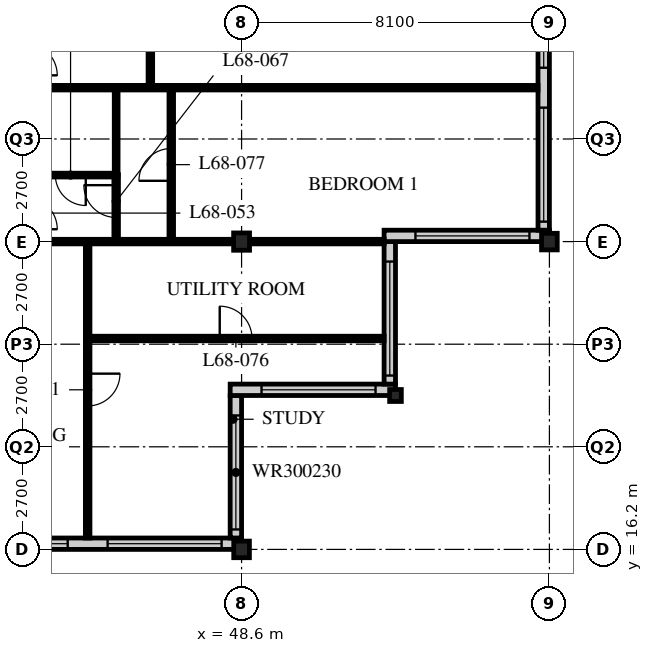
"""IFC4 building model, lengths in metres.
Left out: names, types, materials, properties, quantities, classifications, styles, units other than length and angle.
Written with IfcOpenShell. Run it as: python <this file> out.ifc"""

import sys

from ifc_helpers import new_model, si_unit, direction, frame, frame_2d, origin, origin_2d, place, context, subcontext, project, spatial, rectangle, i_section, extrude, element, fill, save


model = new_model("IFC4")
c1 = context("Model", 3, precision=1e-05, world=origin(), true_north=direction((0.0, 1.0)))
c2 = subcontext(c1, "Body", "Model", "MODEL_VIEW")
j1 = project(units=[si_unit("LENGTHUNIT", "METRE"), si_unit("PLANEANGLEUNIT", "RADIAN")], contexts=[c1])
p1 = place(None, origin())
s1 = spatial("IfcSite", under=j1, at=p1, CompositionType="ELEMENT")
p2 = place(p1, origin())
s2 = spatial("IfcBuilding", under=s1, at=p2, CompositionType="ELEMENT")
p3 = place(p2, frame((0.0, 0.0, 265.8)))
s3 = spatial("IfcBuildingStorey", under=s2, at=p3, CompositionType="ELEMENT", Elevation=265.8)
p4 = place(p3, frame((48.6, 16.2, 0.0), z_axis=(0.0, 0.0, 1.0), x_axis=(1.0, 0.0, 0.0)))
e1 = element("IfcColumn", 1, at=p4, inside=s3, PredefinedType="COLUMN", context=c2, shape_type="SweptSolid", body=[
    extrude(i_section(OverallWidth=0.412, OverallDepth=0.437, WebThickness=0.036, FlangeThickness=0.058, FilletRadius=0.015, at=origin_2d()), origin(), (0.0, 0.0, 1.0), 3.9),
])
p5 = place(p3, frame((48.6, 24.3, 0.0), z_axis=(0.0, 0.0, 1.0), x_axis=(1.0, 0.0, 0.0)))
e2 = element("IfcColumn", 2, at=p5, inside=s3, PredefinedType="COLUMN", context=c2, shape_type="SweptSolid", body=[
    extrude(i_section(OverallWidth=0.418, OverallDepth=0.456, WebThickness=0.042, FlangeThickness=0.067, FilletRadius=0.015, at=origin_2d()), origin(), (0.0, 0.0, 1.0), 3.9),
])
p6 = place(p3, frame((52.65, 20.25, 0.0), z_axis=(0.0, 0.0, 1.0), x_axis=(1.0, 0.0, 0.0)))
e3 = element("IfcColumn", 3, at=p6, inside=s3, PredefinedType="COLUMN", context=c2, shape_type="SweptSolid", body=[
    extrude(i_section(OverallWidth=0.307, OverallDepth=0.314, WebThickness=0.012, FlangeThickness=0.019, FilletRadius=0.015, at=origin_2d()), origin(), (0.0, 0.0, 1.0), 3.9),
])
p7 = place(p3, frame((56.7, 24.3, 0.0), z_axis=(0.0, 0.0, 1.0), x_axis=(1.0, 0.0, 0.0)))
e4 = element("IfcColumn", 4, at=p7, inside=s3, PredefinedType="COLUMN", context=c2, shape_type="SweptSolid", body=[
    extrude(i_section(OverallWidth=0.412, OverallDepth=0.437, WebThickness=0.036, FlangeThickness=0.058, FilletRadius=0.015, at=origin_2d()), origin(), (0.0, 0.0, 1.0), 3.9),
])
p8 = place(p3, frame((8.4, 16.35, 0.0), z_axis=(0.0, 0.0, 1.0), x_axis=(1.0, 0.0, 0.0)))
e5 = element("IfcWall", 5, at=p8, inside=s3, PredefinedType="SOLIDWALL", context=c2, shape_type="SweptSolid", body=[
    extrude(rectangle(XDim=40.2, YDim=0.3, at=frame_2d((20.1, 0.0))), origin(), (0.0, 0.0, 1.0), 3.69),
])
p9 = place(p8, frame((0.225, 0.0, 0.6)))
e6 = element("IfcOpeningElement", 6, at=p9, cuts=e5, PredefinedType="OPENING", context=c2, shape_type="SweptSolid", body=[
    extrude(rectangle(XDim=3.0, YDim=2.4, at=frame_2d((1.5, 1.2))), frame((0.0, 0.16, 0.0), z_axis=(0.0, -1.0, 0.0), x_axis=(1.0, 0.0, 0.0)), (0.0, 0.0, 1.0), 0.32),
])
p10 = place(p8, frame((4.275, 0.0, 0.6)))
e7 = element("IfcOpeningElement", 7, at=p10, cuts=e5, PredefinedType="OPENING", context=c2, shape_type="SweptSolid", body=[
    extrude(rectangle(XDim=3.0, YDim=2.4, at=frame_2d((1.5, 1.2))), frame((0.0, 0.16, 0.0), z_axis=(0.0, -1.0, 0.0), x_axis=(1.0, 0.0, 0.0)), (0.0, 0.0, 1.0), 0.32),
])
p11 = place(p8, frame((8.325, 0.0, 0.6)))
e8 = element("IfcOpeningElement", 8, at=p11, cuts=e5, PredefinedType="OPENING", context=c2, shape_type="SweptSolid", body=[
    extrude(rectangle(XDim=3.0, YDim=2.4, at=frame_2d((1.5, 1.2))), frame((0.0, 0.16, 0.0), z_axis=(0.0, -1.0, 0.0), x_axis=(1.0, 0.0, 0.0)), (0.0, 0.0, 1.0), 0.32),
])
p12 = place(p8, frame((12.375, 0.0, 0.6)))
e9 = element("IfcOpeningElement", 9, at=p12, cuts=e5, PredefinedType="OPENING", context=c2, shape_type="SweptSolid", body=[
    extrude(rectangle(XDim=3.0, YDim=2.4, at=frame_2d((1.5, 1.2))), frame((0.0, 0.16, 0.0), z_axis=(0.0, -1.0, 0.0), x_axis=(1.0, 0.0, 0.0)), (0.0, 0.0, 1.0), 0.32),
])
p13 = place(p8, frame((16.425, 0.0, 0.6)))
e10 = element("IfcOpeningElement", 10, at=p13, cuts=e5, PredefinedType="OPENING", context=c2, shape_type="SweptSolid", body=[
    extrude(rectangle(XDim=3.0, YDim=2.4, at=frame_2d((1.5, 1.2))), frame((0.0, 0.16, 0.0), z_axis=(0.0, -1.0, 0.0), x_axis=(1.0, 0.0, 0.0)), (0.0, 0.0, 1.0), 0.32),
])
p14 = place(p8, frame((20.475, 0.0, 0.6)))
e11 = element("IfcOpeningElement", 11, at=p14, cuts=e5, PredefinedType="OPENING", context=c2, shape_type="SweptSolid", body=[
    extrude(rectangle(XDim=3.0, YDim=2.4, at=frame_2d((1.5, 1.2))), frame((0.0, 0.16, 0.0), z_axis=(0.0, -1.0, 0.0), x_axis=(1.0, 0.0, 0.0)), (0.0, 0.0, 1.0), 0.32),
])
p15 = place(p8, frame((24.525, 0.0, 0.6)))
e12 = element("IfcOpeningElement", 12, at=p15, cuts=e5, PredefinedType="OPENING", context=c2, shape_type="SweptSolid", body=[
    extrude(rectangle(XDim=3.0, YDim=2.4, at=frame_2d((1.5, 1.2))), frame((0.0, 0.16, 0.0), z_axis=(0.0, -1.0, 0.0), x_axis=(1.0, 0.0, 0.0)), (0.0, 0.0, 1.0), 0.32),
])
p16 = place(p8, frame((28.575, 0.0, 0.6)))
e13 = element("IfcOpeningElement", 13, at=p16, cuts=e5, PredefinedType="OPENING", context=c2, shape_type="SweptSolid", body=[
    extrude(rectangle(XDim=3.0, YDim=2.4, at=frame_2d((1.5, 1.2))), frame((0.0, 0.16, 0.0), z_axis=(0.0, -1.0, 0.0), x_axis=(1.0, 0.0, 0.0)), (0.0, 0.0, 1.0), 0.32),
])
p17 = place(p8, frame((32.625, 0.0, 0.6)))
e14 = element("IfcOpeningElement", 14, at=p17, cuts=e5, PredefinedType="OPENING", context=c2, shape_type="SweptSolid", body=[
    extrude(rectangle(XDim=3.0, YDim=2.4, at=frame_2d((1.5, 1.2))), frame((0.0, 0.16, 0.0), z_axis=(0.0, -1.0, 0.0), x_axis=(1.0, 0.0, 0.0)), (0.0, 0.0, 1.0), 0.32),
])
p18 = place(p8, frame((36.675, 0.0, 0.6)))
e15 = element("IfcOpeningElement", 15, at=p18, cuts=e5, PredefinedType="OPENING", context=c2, shape_type="SweptSolid", body=[
    extrude(rectangle(XDim=3.0, YDim=2.4, at=frame_2d((1.5, 1.2))), frame((0.0, 0.16, 0.0), z_axis=(0.0, -1.0, 0.0), x_axis=(1.0, 0.0, 0.0)), (0.0, 0.0, 1.0), 0.32),
])
p19 = place(p3, frame((48.45, 16.5, 0.0), z_axis=(0.0, 0.0, 1.0), x_axis=(0.0, 1.0, 0.0)))
e16 = element("IfcWall", 16, at=p19, inside=s3, PredefinedType="SOLIDWALL", context=c2, shape_type="SweptSolid", body=[
    extrude(rectangle(XDim=3.75, YDim=0.3, at=frame_2d((1.875, 0.0))), origin(), (0.0, 0.0, 1.0), 3.69),
])
p20 = place(p19, frame((0.225, 0.0, 0.6)))
e17 = element("IfcOpeningElement", 17, at=p20, cuts=e16, PredefinedType="OPENING", context=c2, shape_type="SweptSolid", body=[
    extrude(rectangle(XDim=3.0, YDim=2.3, at=frame_2d((1.5, 1.15))), frame((0.0, 0.16, 0.0), z_axis=(0.0, -1.0, 0.0), x_axis=(1.0, 0.0, 0.0)), (0.0, 0.0, 1.0), 0.32),
])
p21 = place(p3, frame((48.3, 20.4, 0.0), z_axis=(0.0, 0.0, 1.0), x_axis=(1.0, 0.0, 0.0)))
e18 = element("IfcWall", 18, at=p21, inside=s3, PredefinedType="SOLIDWALL", context=c2, shape_type="SweptSolid", body=[
    extrude(rectangle(XDim=4.35, YDim=0.3, at=frame_2d((2.175, 0.0))), origin(), (0.0, 0.0, 1.0), 3.69),
])
p22 = place(p21, frame((0.825, 0.0, 0.6)))
e19 = element("IfcOpeningElement", 19, at=p22, cuts=e18, PredefinedType="OPENING", context=c2, shape_type="SweptSolid", body=[
    extrude(rectangle(XDim=3.0, YDim=2.3, at=frame_2d((1.5, 1.15))), frame((0.0, 0.16, 0.0), z_axis=(0.0, -1.0, 0.0), x_axis=(1.0, 0.0, 0.0)), (0.0, 0.0, 1.0), 0.32),
])
p23 = place(p3, frame((52.5, 20.55, 0.0), z_axis=(0.0, 0.0, 1.0), x_axis=(0.0, 1.0, 0.0)))
e20 = element("IfcWall", 20, at=p23, inside=s3, PredefinedType="SOLIDWALL", context=c2, shape_type="SweptSolid", body=[
    extrude(rectangle(XDim=3.75, YDim=0.3, at=frame_2d((1.875, 0.0))), origin(), (0.0, 0.0, 1.0), 3.69),
])
p24 = place(p23, frame((0.225, 0.0, 0.6)))
e21 = element("IfcOpeningElement", 21, at=p24, cuts=e20, PredefinedType="OPENING", context=c2, shape_type="SweptSolid", body=[
    extrude(rectangle(XDim=3.0, YDim=2.3, at=frame_2d((1.5, 1.15))), frame((0.0, 0.16, 0.0), z_axis=(0.0, -1.0, 0.0), x_axis=(1.0, 0.0, 0.0)), (0.0, 0.0, 1.0), 0.32),
])
p25 = place(p3, frame((52.35, 24.45, 0.0), z_axis=(0.0, 0.0, 1.0), x_axis=(1.0, 0.0, 0.0)))
e22 = element("IfcWall", 22, at=p25, inside=s3, PredefinedType="SOLIDWALL", context=c2, shape_type="SweptSolid", body=[
    extrude(rectangle(XDim=4.35, YDim=0.3, at=frame_2d((2.175, 0.0))), origin(), (0.0, 0.0, 1.0), 3.69),
])
p26 = place(p25, frame((0.825, 0.0, 0.6)))
e23 = element("IfcOpeningElement", 23, at=p26, cuts=e22, PredefinedType="OPENING", context=c2, shape_type="SweptSolid", body=[
    extrude(rectangle(XDim=3.0, YDim=2.3, at=frame_2d((1.5, 1.15))), frame((0.0, 0.16, 0.0), z_axis=(0.0, -1.0, 0.0), x_axis=(1.0, 0.0, 0.0)), (0.0, 0.0, 1.0), 0.32),
])
p27 = place(p3, frame((56.55, 24.6, 0.0), z_axis=(0.0, 0.0, 1.0), x_axis=(0.0, 1.0, 0.0)))
e24 = element("IfcWall", 24, at=p27, inside=s3, PredefinedType="SOLIDWALL", context=c2, shape_type="SweptSolid", body=[
    extrude(rectangle(XDim=32.1, YDim=0.3, at=frame_2d((16.05, 0.0))), origin(), (0.0, 0.0, 1.0), 3.69),
])
p28 = place(p27, frame((0.225, 0.0, 0.6)))
e25 = element("IfcOpeningElement", 25, at=p28, cuts=e24, PredefinedType="OPENING", context=c2, shape_type="SweptSolid", body=[
    extrude(rectangle(XDim=3.0, YDim=2.4, at=frame_2d((1.5, 1.2))), frame((0.0, 0.16, 0.0), z_axis=(0.0, -1.0, 0.0), x_axis=(1.0, 0.0, 0.0)), (0.0, 0.0, 1.0), 0.32),
])
p29 = place(p27, frame((4.275, 0.0, 0.6)))
e26 = element("IfcOpeningElement", 26, at=p29, cuts=e24, PredefinedType="OPENING", context=c2, shape_type="SweptSolid", body=[
    extrude(rectangle(XDim=3.0, YDim=2.4, at=frame_2d((1.5, 1.2))), frame((0.0, 0.16, 0.0), z_axis=(0.0, -1.0, 0.0), x_axis=(1.0, 0.0, 0.0)), (0.0, 0.0, 1.0), 0.32),
])
p30 = place(p27, frame((8.325, 0.0, 0.6)))
e27 = element("IfcOpeningElement", 27, at=p30, cuts=e24, PredefinedType="OPENING", context=c2, shape_type="SweptSolid", body=[
    extrude(rectangle(XDim=3.0, YDim=2.4, at=frame_2d((1.5, 1.2))), frame((0.0, 0.16, 0.0), z_axis=(0.0, -1.0, 0.0), x_axis=(1.0, 0.0, 0.0)), (0.0, 0.0, 1.0), 0.32),
])
p31 = place(p27, frame((12.375, 0.0, 0.6)))
e28 = element("IfcOpeningElement", 28, at=p31, cuts=e24, PredefinedType="OPENING", context=c2, shape_type="SweptSolid", body=[
    extrude(rectangle(XDim=3.0, YDim=2.4, at=frame_2d((1.5, 1.2))), frame((0.0, 0.16, 0.0), z_axis=(0.0, -1.0, 0.0), x_axis=(1.0, 0.0, 0.0)), (0.0, 0.0, 1.0), 0.32),
])
p32 = place(p27, frame((16.425, 0.0, 0.6)))
e29 = element("IfcOpeningElement", 29, at=p32, cuts=e24, PredefinedType="OPENING", context=c2, shape_type="SweptSolid", body=[
    extrude(rectangle(XDim=3.0, YDim=2.4, at=frame_2d((1.5, 1.2))), frame((0.0, 0.16, 0.0), z_axis=(0.0, -1.0, 0.0), x_axis=(1.0, 0.0, 0.0)), (0.0, 0.0, 1.0), 0.32),
])
p33 = place(p27, frame((20.475, 0.0, 0.6)))
e30 = element("IfcOpeningElement", 30, at=p33, cuts=e24, PredefinedType="OPENING", context=c2, shape_type="SweptSolid", body=[
    extrude(rectangle(XDim=3.0, YDim=2.4, at=frame_2d((1.5, 1.2))), frame((0.0, 0.16, 0.0), z_axis=(0.0, -1.0, 0.0), x_axis=(1.0, 0.0, 0.0)), (0.0, 0.0, 1.0), 0.32),
])
p34 = place(p27, frame((24.525, 0.0, 0.6)))
e31 = element("IfcOpeningElement", 31, at=p34, cuts=e24, PredefinedType="OPENING", context=c2, shape_type="SweptSolid", body=[
    extrude(rectangle(XDim=3.0, YDim=2.4, at=frame_2d((1.5, 1.2))), frame((0.0, 0.16, 0.0), z_axis=(0.0, -1.0, 0.0), x_axis=(1.0, 0.0, 0.0)), (0.0, 0.0, 1.0), 0.32),
])
p35 = place(p27, frame((28.575, 0.0, 0.6)))
e32 = element("IfcOpeningElement", 32, at=p35, cuts=e24, PredefinedType="OPENING", context=c2, shape_type="SweptSolid", body=[
    extrude(rectangle(XDim=3.0, YDim=2.4, at=frame_2d((1.5, 1.2))), frame((0.0, 0.16, 0.0), z_axis=(0.0, -1.0, 0.0), x_axis=(1.0, 0.0, 0.0)), (0.0, 0.0, 1.0), 0.32),
])
p36 = place(p3, frame((42.9, 24.3, 0.0), z_axis=(0.0, 0.0, 1.0), x_axis=(1.0, 0.0, 0.0)))
e33 = element("IfcWall", 33, at=p36, inside=s3, PredefinedType="PARTITIONING", context=c2, shape_type="SweptSolid", body=[
    extrude(rectangle(XDim=9.45, YDim=0.12, at=frame_2d((4.725, 0.0))), origin(), (0.0, 0.0, 1.0), 3.078),
])
p37 = place(p3, frame((44.55, 16.5, 0.0), z_axis=(0.0, 0.0, 1.0), x_axis=(0.0, 1.0, 0.0)))
e34 = element("IfcWall", 34, at=p37, inside=s3, PredefinedType="PARTITIONING", context=c2, shape_type="SweptSolid", body=[
    extrude(rectangle(XDim=7.8, YDim=0.12, at=frame_2d((3.9, 0.0))), origin(), (0.0, 0.0, 1.0), 3.69),
])
p38 = place(p37, frame((3.475, 0.0, 0.0)))
e35 = element("IfcOpeningElement", 35, at=p38, cuts=e34, PredefinedType="OPENING", context=c2, shape_type="SweptSolid", body=[
    extrude(rectangle(XDim=0.85, YDim=2.1, at=frame_2d((0.425, 1.05))), frame((0.0, 0.07, 0.0), z_axis=(0.0, -1.0, 0.0), x_axis=(1.0, 0.0, 0.0)), (0.0, 0.0, 1.0), 0.14),
])
p39 = place(p3, frame((42.9, 26.05, 0.0), z_axis=(0.0, 0.0, 1.0), x_axis=(1.0, 0.0, 0.0)))
e36 = element("IfcWall", 36, at=p39, inside=s3, PredefinedType="PARTITIONING", context=c2, shape_type="SweptSolid", body=[
    extrude(rectangle(XDim=2.4, YDim=0.1, at=frame_2d((1.2, 0.0))), origin(), (0.0, 0.0, 1.0), 3.69),
])
p40 = place(p39, frame((0.8, 0.0, 0.0)))
e37 = element("IfcOpeningElement", 37, at=p40, cuts=e36, PredefinedType="OPENING", context=c2, shape_type="SweptSolid", body=[
    extrude(rectangle(XDim=0.8, YDim=2.1, at=frame_2d((0.4, 1.05))), frame((0.0, 0.06, 0.0), z_axis=(0.0, -1.0, 0.0), x_axis=(1.0, 0.0, 0.0)), (0.0, 0.0, 1.0), 0.12),
])
p41 = place(p3, frame((45.3, 26.05, 0.0), z_axis=(0.0, 0.0, 1.0), x_axis=(0.0, 1.0, 0.0)))
e38 = element("IfcWall", 38, at=p41, inside=s3, PredefinedType="PARTITIONING", context=c2, shape_type="SweptSolid", body=[
    extrude(rectangle(XDim=2.3, YDim=0.1, at=frame_2d((1.15, 0.0))), origin(), (0.0, 0.0, 1.0), 3.69),
])
p42 = place(p3, frame((42.9, 28.35, 0.0), z_axis=(0.0, 0.0, 1.0), x_axis=(1.0, 0.0, 0.0)))
e39 = element("IfcWall", 39, at=p42, inside=s3, PredefinedType="PARTITIONING", context=c2, shape_type="SweptSolid", body=[
    extrude(rectangle(XDim=13.5, YDim=0.12, at=frame_2d((6.75, 0.0))), origin(), (0.0, 0.0, 1.0), 3.69),
])
p43 = place(p3, frame((45.3, 24.3, 0.0), z_axis=(0.0, 0.0, 1.0), x_axis=(0.0, 1.0, 0.0)))
e40 = element("IfcWall", 40, at=p43, inside=s3, PredefinedType="PARTITIONING", context=c2, shape_type="SweptSolid", body=[
    extrude(rectangle(XDim=1.76, YDim=0.12, at=frame_2d((0.88, 0.0))), origin(), (0.0, 0.0, 1.0), 3.69),
])
p44 = place(p43, frame((0.635, 0.0, 0.0)))
e41 = element("IfcOpeningElement", 41, at=p44, cuts=e40, PredefinedType="OPENING", context=c2, shape_type="SweptSolid", body=[
    extrude(rectangle(XDim=0.85, YDim=2.1, at=frame_2d((0.425, 1.05))), frame((0.0, 0.07, 0.0), z_axis=(0.0, -1.0, 0.0), x_axis=(1.0, 0.0, 0.0)), (0.0, 0.0, 1.0), 0.14),
])
p45 = place(p3, frame((44.55, 21.75, 0.0), z_axis=(0.0, 0.0, 1.0), x_axis=(1.0, 0.0, 0.0)))
e42 = element("IfcWall", 42, at=p45, inside=s3, PredefinedType="PARTITIONING", context=c2, shape_type="SweptSolid", body=[
    extrude(rectangle(XDim=7.8, YDim=0.12, at=frame_2d((3.9, 0.0))), origin(), (0.0, 0.0, 1.0), 3.69),
])
p46 = place(p45, frame((3.475, 0.0, 0.0)))
e43 = element("IfcOpeningElement", 43, at=p46, cuts=e42, PredefinedType="OPENING", context=c2, shape_type="SweptSolid", body=[
    extrude(rectangle(XDim=0.85, YDim=2.1, at=frame_2d((0.425, 1.05))), frame((0.0, 0.07, 0.0), z_axis=(0.0, -1.0, 0.0), x_axis=(1.0, 0.0, 0.0)), (0.0, 0.0, 1.0), 0.14),
])
p47 = place(p3, frame((46.75, 24.3, 0.0), z_axis=(0.0, 0.0, 1.0), x_axis=(0.0, 1.0, 0.0)))
e44 = element("IfcWall", 44, at=p47, inside=s3, PredefinedType="PARTITIONING", context=c2, shape_type="SweptSolid", body=[
    extrude(rectangle(XDim=4.05, YDim=0.12, at=frame_2d((2.025, 0.0))), origin(), (0.0, 0.0, 1.0), 3.69),
])
p48 = place(p47, frame((1.6, 0.0, 0.0)))
e45 = element("IfcOpeningElement", 45, at=p48, cuts=e44, PredefinedType="OPENING", context=c2, shape_type="SweptSolid", body=[
    extrude(rectangle(XDim=0.85, YDim=2.1, at=frame_2d((0.425, 1.05))), frame((0.0, 0.07, 0.0), z_axis=(0.0, -1.0, 0.0), x_axis=(1.0, 0.0, 0.0)), (0.0, 0.0, 1.0), 0.14),
])
p49 = place(p3, frame((46.2, 28.35, 0.0), z_axis=(0.0, 0.0, 1.0), x_axis=(0.0, 1.0, 0.0)))
e46 = element("IfcWall", 46, at=p49, inside=s3, PredefinedType="PARTITIONING", context=c2, shape_type="SweptSolid", body=[
    extrude(rectangle(XDim=12.15, YDim=0.12, at=frame_2d((6.075, 0.0))), origin(), (0.0, 0.0, 1.0), 3.69),
])
p50 = place(p49, frame((1.6, 0.0, 0.0)))
e47 = element("IfcOpeningElement", 47, at=p50, cuts=e46, PredefinedType="OPENING", context=c2, shape_type="SweptSolid", body=[
    extrude(rectangle(XDim=0.85, YDim=2.1, at=frame_2d((0.425, 1.05))), frame((0.0, 0.07, 0.0), z_axis=(0.0, -1.0, 0.0), x_axis=(1.0, 0.0, 0.0)), (0.0, 0.0, 1.0), 0.14),
])
p51 = place(p49, frame((9.7, 0.0, 0.0)))
e48 = element("IfcOpeningElement", 48, at=p51, cuts=e46, PredefinedType="OPENING", context=c2, shape_type="SweptSolid", body=[
    extrude(rectangle(XDim=0.85, YDim=2.1, at=frame_2d((0.425, 1.05))), frame((0.0, 0.07, 0.0), z_axis=(0.0, -1.0, 0.0), x_axis=(1.0, 0.0, 0.0)), (0.0, 0.0, 1.0), 0.14),
])
p52 = place(p49, frame((5.65, 0.0, 0.0)))
e49 = element("IfcOpeningElement", 49, at=p52, cuts=e46, PredefinedType="OPENING", context=c2, shape_type="SweptSolid", body=[
    extrude(rectangle(XDim=0.85, YDim=2.1, at=frame_2d((0.425, 1.05))), frame((0.0, 0.07, 0.0), z_axis=(0.0, -1.0, 0.0), x_axis=(1.0, 0.0, 0.0)), (0.0, 0.0, 1.0), 0.14),
])
p53 = place(p17, origin())
e50 = element("IfcWindow", 50, at=p53, inside=s3, PartitioningType="SINGLE_PANEL", PredefinedType="WINDOW", context=c2, shape_type="SweptSolid", body=[
    extrude(rectangle(XDim=3.0, YDim=2.4, at=frame_2d((1.5, 1.2))), frame((0.0, 0.03, 0.0), z_axis=(0.0, -1.0, 0.0), x_axis=(1.0, 0.0, 0.0)), (0.0, 0.0, 1.0), 0.06),
])
fill(e14, e50)
p54 = place(p18, origin())
e51 = element("IfcWindow", 51, at=p54, inside=s3, PartitioningType="SINGLE_PANEL", PredefinedType="WINDOW", context=c2, shape_type="SweptSolid", body=[
    extrude(rectangle(XDim=3.0, YDim=2.4, at=frame_2d((1.5, 1.2))), frame((0.0, 0.03, 0.0), z_axis=(0.0, -1.0, 0.0), x_axis=(1.0, 0.0, 0.0)), (0.0, 0.0, 1.0), 0.06),
])
fill(e15, e51)
p55 = place(p20, origin())
e52 = element("IfcWindow", 52, at=p55, inside=s3, PartitioningType="SINGLE_PANEL", PredefinedType="WINDOW", context=c2, shape_type="SweptSolid", body=[
    extrude(rectangle(XDim=3.0, YDim=2.3, at=frame_2d((1.5, 1.15))), frame((0.0, 0.03, 0.0), z_axis=(0.0, -1.0, 0.0), x_axis=(1.0, 0.0, 0.0)), (0.0, 0.0, 1.0), 0.06),
])
fill(e17, e52)
p56 = place(p22, origin())
e53 = element("IfcWindow", 53, at=p56, inside=s3, PartitioningType="SINGLE_PANEL", PredefinedType="WINDOW", context=c2, shape_type="SweptSolid", body=[
    extrude(rectangle(XDim=3.0, YDim=2.3, at=frame_2d((1.5, 1.15))), frame((0.0, 0.03, 0.0), z_axis=(0.0, -1.0, 0.0), x_axis=(1.0, 0.0, 0.0)), (0.0, 0.0, 1.0), 0.06),
])
fill(e19, e53)
p57 = place(p24, origin())
e54 = element("IfcWindow", 54, at=p57, inside=s3, PartitioningType="SINGLE_PANEL", PredefinedType="WINDOW", context=c2, shape_type="SweptSolid", body=[
    extrude(rectangle(XDim=3.0, YDim=2.3, at=frame_2d((1.5, 1.15))), frame((0.0, 0.03, 0.0), z_axis=(0.0, -1.0, 0.0), x_axis=(1.0, 0.0, 0.0)), (0.0, 0.0, 1.0), 0.06),
])
fill(e21, e54)
p58 = place(p26, origin())
e55 = element("IfcWindow", 55, at=p58, inside=s3, PartitioningType="SINGLE_PANEL", PredefinedType="WINDOW", context=c2, shape_type="SweptSolid", body=[
    extrude(rectangle(XDim=3.0, YDim=2.3, at=frame_2d((1.5, 1.15))), frame((0.0, 0.03, 0.0), z_axis=(0.0, -1.0, 0.0), x_axis=(1.0, 0.0, 0.0)), (0.0, 0.0, 1.0), 0.06),
])
fill(e23, e55)
p59 = place(p28, origin())
e56 = element("IfcWindow", 56, at=p59, inside=s3, PartitioningType="SINGLE_PANEL", PredefinedType="WINDOW", context=c2, shape_type="SweptSolid", body=[
    extrude(rectangle(XDim=3.0, YDim=2.4, at=frame_2d((1.5, 1.2))), frame((0.0, 0.03, 0.0), z_axis=(0.0, -1.0, 0.0), x_axis=(1.0, 0.0, 0.0)), (0.0, 0.0, 1.0), 0.06),
])
fill(e25, e56)
p60 = place(p29, origin())
e57 = element("IfcWindow", 57, at=p60, inside=s3, PartitioningType="SINGLE_PANEL", PredefinedType="WINDOW", context=c2, shape_type="SweptSolid", body=[
    extrude(rectangle(XDim=3.0, YDim=2.4, at=frame_2d((1.5, 1.2))), frame((0.0, 0.03, 0.0), z_axis=(0.0, -1.0, 0.0), x_axis=(1.0, 0.0, 0.0)), (0.0, 0.0, 1.0), 0.06),
])
fill(e26, e57)
p61 = place(p38, origin())
e58 = element("IfcDoor", 58, at=p61, inside=s3, OperationType="SINGLE_SWING_LEFT", PredefinedType="DOOR", context=c2, shape_type="SweptSolid", body=[
    extrude(rectangle(XDim=0.85, YDim=2.1, at=frame_2d((0.425, 1.05))), frame((0.0, 0.025, 0.0), z_axis=(0.0, -1.0, 0.0), x_axis=(1.0, 0.0, 0.0)), (0.0, 0.0, 1.0), 0.05),
])
fill(e35, e58)
p62 = place(p40, origin())
e59 = element("IfcDoor", 59, at=p62, inside=s3, OperationType="SINGLE_SWING_LEFT", PredefinedType="DOOR", context=c2, shape_type="SweptSolid", body=[
    extrude(rectangle(XDim=0.8, YDim=2.1, at=frame_2d((0.4, 1.05))), frame((0.0, 0.025, 0.0), z_axis=(0.0, -1.0, 0.0), x_axis=(1.0, 0.0, 0.0)), (0.0, 0.0, 1.0), 0.05),
])
fill(e37, e59)
p63 = place(p44, origin())
e60 = element("IfcDoor", 60, at=p63, inside=s3, OperationType="SINGLE_SWING_RIGHT", PredefinedType="DOOR", context=c2, shape_type="SweptSolid", body=[
    extrude(rectangle(XDim=0.85, YDim=2.1, at=frame_2d((0.425, 1.05))), frame((0.0, 0.025, 0.0), z_axis=(0.0, -1.0, 0.0), x_axis=(1.0, 0.0, 0.0)), (0.0, 0.0, 1.0), 0.05),
])
fill(e41, e60)
p64 = place(p46, origin())
e61 = element("IfcDoor", 61, at=p64, inside=s3, OperationType="SINGLE_SWING_LEFT", PredefinedType="DOOR", context=c2, shape_type="SweptSolid", body=[
    extrude(rectangle(XDim=0.85, YDim=2.1, at=frame_2d((0.425, 1.05))), frame((0.0, 0.025, 0.0), z_axis=(0.0, -1.0, 0.0), x_axis=(1.0, 0.0, 0.0)), (0.0, 0.0, 1.0), 0.05),
])
fill(e43, e61)
p65 = place(p48, origin())
e62 = element("IfcDoor", 62, at=p65, inside=s3, OperationType="SINGLE_SWING_LEFT", PredefinedType="DOOR", context=c2, shape_type="SweptSolid", body=[
    extrude(rectangle(XDim=0.85, YDim=2.1, at=frame_2d((0.425, 1.05))), frame((0.0, 0.025, 0.0), z_axis=(0.0, -1.0, 0.0), x_axis=(1.0, 0.0, 0.0)), (0.0, 0.0, 1.0), 0.05),
])
fill(e45, e62)
save(model, sys.argv[1])
